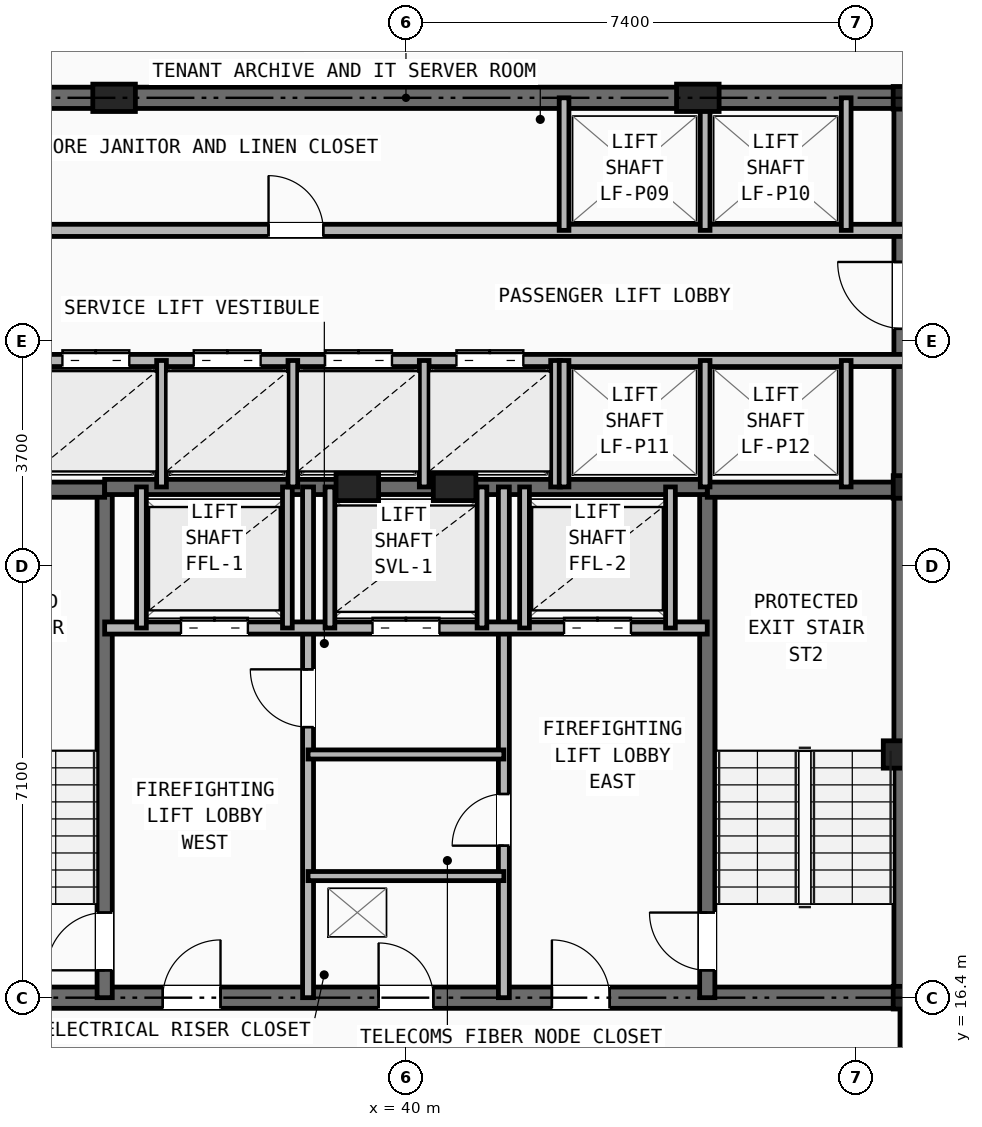
"""IFC4 building model, lengths in metres.
Left out: names, types, materials, properties, quantities, classifications, styles, units other than length and angle.
Written with IfcOpenShell. Run it as: python <this file> out.ifc"""

import sys

from ifc_helpers import new_model, si_unit, direction, frame, frame_2d, origin, origin_2d, place, context, subcontext, project, spatial, rectangle, i_section, extrude, element, fill, save


model = new_model("IFC4")
c1 = context("Model", 3, precision=1e-05, world=origin(), true_north=direction((0.0, 1.0)))
c2 = subcontext(c1, "Body", "Model", "MODEL_VIEW")
j1 = project(units=[si_unit("LENGTHUNIT", "METRE"), si_unit("PLANEANGLEUNIT", "RADIAN")], contexts=[c1])
p1 = place(None, origin())
s1 = spatial("IfcSite", under=j1, at=p1, CompositionType="ELEMENT")
p2 = place(p1, origin())
s2 = spatial("IfcBuilding", under=s1, at=p2, CompositionType="ELEMENT")
p3 = place(p2, frame((0.0, 0.0, 193.05)))
s3 = spatial("IfcBuildingStorey", under=s2, at=p3, CompositionType="ELEMENT", Elevation=193.05)
for number, where, z_axis, x_axis in (
    (1, (48.2, 16.4, 0.0), (0.0, 0.0, 1.0), (1.0, 0.0, 0.0)),
    (2, (48.2, 24.8, 0.0), (0.0, 0.0, 1.0), (1.0, 0.0, 0.0)),
    (3, (48.2, 31.2, 0.0), (0.0, 0.0, 1.0), (1.0, 0.0, 0.0)),
):
    element("IfcColumn", number, at=place(p3, frame(where, z_axis=z_axis, x_axis=x_axis)), inside=s3, PredefinedType="COLUMN", context=c2, shape_type="SweptSolid", body=[
        extrude(i_section(OverallWidth=0.374, OverallDepth=0.372, WebThickness=0.016, FlangeThickness=0.026, at=origin_2d()), origin(), (0.0, 0.0, 1.0), 3.45),
    ])
for number, where, z_axis, x_axis in (
    (4, (48.2, 20.4, 0.0), (0.0, 0.0, 1.0), (1.0, 0.0, 0.0)),
    (5, (35.2, 31.2, 0.0), (0.0, 0.0, 1.0), (1.0, 0.0, 0.0)),
    (6, (44.8, 31.2, 0.0), (0.0, 0.0, 1.0), (1.0, 0.0, 0.0)),
    (7, (39.2, 24.8, 0.0), (0.0, 0.0, 1.0), (1.0, 0.0, 0.0)),
    (8, (40.8, 24.8, 0.0), (0.0, 0.0, 1.0), (1.0, 0.0, 0.0)),
):
    element("IfcColumn", number, at=place(p3, frame(where, z_axis=z_axis, x_axis=x_axis)), inside=s3, PredefinedType="PILASTER", context=c2, shape_type="SweptSolid", body=[
        extrude(rectangle(XDim=0.7, YDim=0.45, at=origin_2d()), origin(), (0.0, 0.0, 1.0), 3.45),
    ])
p4 = place(p3, frame((31.8, 16.4, 0.0), z_axis=(0.0, 0.0, 1.0), x_axis=(1.0, 0.0, 0.0)))
e9 = element("IfcWall", 9, at=p4, inside=s3, PredefinedType="SHEAR", context=c2, shape_type="SweptSolid", body=[
    extrude(rectangle(XDim=16.4, YDim=0.35, at=frame_2d((8.2, 0.0))), origin(), (0.0, 0.0, 1.0), 3.03),
])
p5 = place(p4, frame((7.75, 0.0, 0.0)))
e10 = element("IfcOpeningElement", 10, at=p5, cuts=e9, PredefinedType="OPENING", context=c2, shape_type="SweptSolid", body=[
    extrude(rectangle(XDim=0.9, YDim=2.1, at=frame_2d((0.45, 1.05))), frame((0.0, 0.185, 0.0), z_axis=(0.0, -1.0, 0.0), x_axis=(1.0, 0.0, 0.0)), (0.0, 0.0, 1.0), 0.37),
])
p6 = place(p4, frame((4.2, 0.0, 0.0)))
e11 = element("IfcOpeningElement", 11, at=p6, cuts=e9, PredefinedType="OPENING", context=c2, shape_type="SweptSolid", body=[
    extrude(rectangle(XDim=0.95, YDim=2.1, at=frame_2d((0.475, 1.05))), frame((0.0, 0.185, 0.0), z_axis=(0.0, -1.0, 0.0), x_axis=(1.0, 0.0, 0.0)), (0.0, 0.0, 1.0), 0.37),
])
p7 = place(p4, frame((10.6, 0.0, 0.0)))
e12 = element("IfcOpeningElement", 12, at=p7, cuts=e9, PredefinedType="OPENING", context=c2, shape_type="SweptSolid", body=[
    extrude(rectangle(XDim=0.95, YDim=2.1, at=frame_2d((0.475, 1.05))), frame((0.0, 0.185, 0.0), z_axis=(0.0, -1.0, 0.0), x_axis=(1.0, 0.0, 0.0)), (0.0, 0.0, 1.0), 0.37),
])
p8 = place(p3, frame((31.8, 31.2, 0.0), z_axis=(0.0, 0.0, 1.0), x_axis=(1.0, 0.0, 0.0)))
e13 = element("IfcWall", 13, at=p8, inside=s3, PredefinedType="SHEAR", context=c2, shape_type="SweptSolid", body=[
    extrude(rectangle(XDim=16.4, YDim=0.35, at=frame_2d((8.2, 0.0))), origin(), (0.0, 0.0, 1.0), 3.03),
])
p9 = place(p3, frame((48.2, 16.4, 0.0), z_axis=(0.0, 0.0, 1.0), x_axis=(0.0, 1.0, 0.0)))
e14 = element("IfcWall", 14, at=p9, inside=s3, PredefinedType="SHEAR", context=c2, shape_type="SweptSolid", body=[
    extrude(rectangle(XDim=14.8, YDim=0.35, at=frame_2d((7.4, 0.0))), origin(), (0.0, 0.0, 1.0), 3.03),
])
p10 = place(p9, frame((11.0, 0.0, 0.0)))
e15 = element("IfcOpeningElement", 15, at=p10, cuts=e14, PredefinedType="OPENING", context=c2, shape_type="SweptSolid", body=[
    extrude(rectangle(XDim=1.1, YDim=2.15, at=frame_2d((0.55, 1.075))), frame((0.0, 0.185, 0.0), z_axis=(0.0, -1.0, 0.0), x_axis=(1.0, 0.0, 0.0)), (0.0, 0.0, 1.0), 0.37),
])
p11 = place(p3, frame((35.045, 16.4, 0.0), z_axis=(0.0, 0.0, 1.0), x_axis=(0.0, 1.0, 0.0)))
e16 = element("IfcWall", 16, at=p11, inside=s3, PredefinedType="SHEAR", context=c2, shape_type="SweptSolid", body=[
    extrude(rectangle(XDim=8.4, YDim=0.25, at=frame_2d((4.2, 0.0))), origin(), (0.0, 0.0, 1.0), 3.03),
])
p12 = place(p11, frame((0.45, 0.0, 0.0)))
e17 = element("IfcOpeningElement", 17, at=p12, cuts=e16, PredefinedType="OPENING", context=c2, shape_type="SweptSolid", body=[
    extrude(rectangle(XDim=0.95, YDim=2.1, at=frame_2d((0.475, 1.05))), frame((0.0, 0.135, 0.0), z_axis=(0.0, -1.0, 0.0), x_axis=(1.0, 0.0, 0.0)), (0.0, 0.0, 1.0), 0.27),
])
p13 = place(p3, frame((31.8, 24.755, 0.0), z_axis=(0.0, 0.0, 1.0), x_axis=(1.0, 0.0, 0.0)))
e18 = element("IfcWall", 18, at=p13, inside=s3, PredefinedType="SHEAR", context=c2, shape_type="SweptSolid", body=[
    extrude(rectangle(XDim=3.245, YDim=0.25, at=frame_2d((1.623, 0.0))), origin(), (0.0, 0.0, 1.0), 3.03),
])
p14 = place(p3, frame((44.955, 16.4, 0.0), z_axis=(0.0, 0.0, 1.0), x_axis=(0.0, 1.0, 0.0)))
e19 = element("IfcWall", 19, at=p14, inside=s3, PredefinedType="SHEAR", context=c2, shape_type="SweptSolid", body=[
    extrude(rectangle(XDim=8.4, YDim=0.25, at=frame_2d((4.2, 0.0))), origin(), (0.0, 0.0, 1.0), 3.03),
])
p15 = place(p14, frame((0.45, 0.0, 0.0)))
e20 = element("IfcOpeningElement", 20, at=p15, cuts=e19, PredefinedType="OPENING", context=c2, shape_type="SweptSolid", body=[
    extrude(rectangle(XDim=0.95, YDim=2.1, at=frame_2d((0.475, 1.05))), frame((0.0, 0.135, 0.0), z_axis=(0.0, -1.0, 0.0), x_axis=(1.0, 0.0, 0.0)), (0.0, 0.0, 1.0), 0.27),
])
p16 = place(p3, frame((44.955, 24.755, 0.0), z_axis=(0.0, 0.0, 1.0), x_axis=(1.0, 0.0, 0.0)))
e21 = element("IfcWall", 21, at=p16, inside=s3, PredefinedType="SHEAR", context=c2, shape_type="SweptSolid", body=[
    extrude(rectangle(XDim=3.245, YDim=0.25, at=frame_2d((1.623, 0.0))), origin(), (0.0, 0.0, 1.0), 3.03),
])
p17 = place(p3, frame((35.045, 24.8, 0.0), z_axis=(0.0, 0.0, 1.0), x_axis=(1.0, 0.0, 0.0)))
e22 = element("IfcWall", 22, at=p17, inside=s3, PredefinedType="SHEAR", context=c2, shape_type="SweptSolid", body=[
    extrude(rectangle(XDim=9.91, YDim=0.25, at=frame_2d((4.955, 0.0))), origin(), (0.0, 0.0, 1.0), 3.03),
])
p18 = place(p3, frame((38.39, 16.4, 0.0), z_axis=(0.0, 0.0, 1.0), x_axis=(0.0, 1.0, 0.0)))
e23 = element("IfcWall", 23, at=p18, inside=s3, PredefinedType="PARTITIONING", context=c2, shape_type="SweptSolid", body=[
    extrude(rectangle(XDim=8.4, YDim=0.18, at=frame_2d((4.2, 0.0))), origin(), (0.0, 0.0, 1.0), 2.758),
])
p19 = place(p18, frame((4.45, 0.0, 0.0)))
e24 = element("IfcOpeningElement", 24, at=p19, cuts=e23, PredefinedType="OPENING", context=c2, shape_type="SweptSolid", body=[
    extrude(rectangle(XDim=0.95, YDim=2.1, at=frame_2d((0.475, 1.05))), frame((0.0, 0.1, 0.0), z_axis=(0.0, -1.0, 0.0), x_axis=(1.0, 0.0, 0.0)), (0.0, 0.0, 1.0), 0.2),
])
p20 = place(p3, frame((41.61, 16.4, 0.0), z_axis=(0.0, 0.0, 1.0), x_axis=(0.0, 1.0, 0.0)))
e25 = element("IfcWall", 25, at=p20, inside=s3, PredefinedType="PARTITIONING", context=c2, shape_type="SweptSolid", body=[
    extrude(rectangle(XDim=8.4, YDim=0.18, at=frame_2d((4.2, 0.0))), origin(), (0.0, 0.0, 1.0), 2.758),
])
p21 = place(p20, frame((2.5, 0.0, 0.0)))
e26 = element("IfcOpeningElement", 26, at=p21, cuts=e25, PredefinedType="OPENING", context=c2, shape_type="SweptSolid", body=[
    extrude(rectangle(XDim=0.85, YDim=2.05, at=frame_2d((0.425, 1.025))), frame((0.0, 0.1, 0.0), z_axis=(0.0, -1.0, 0.0), x_axis=(1.0, 0.0, 0.0)), (0.0, 0.0, 1.0), 0.2),
])
p22 = place(p3, frame((35.045, 22.48, 0.0), z_axis=(0.0, 0.0, 1.0), x_axis=(1.0, 0.0, 0.0)))
e27 = element("IfcWall", 27, at=p22, inside=s3, PredefinedType="SOLIDWALL", context=c2, shape_type="SweptSolid", body=[
    extrude(rectangle(XDim=9.91, YDim=0.2, at=frame_2d((4.955, 0.0))), origin(), (0.0, 0.0, 1.0), 3.03),
])
p23 = place(p22, frame((1.255, 0.0, 0.0)))
e28 = element("IfcOpeningElement", 28, at=p23, cuts=e27, PredefinedType="OPENING", context=c2, shape_type="SweptSolid", body=[
    extrude(rectangle(XDim=1.1, YDim=2.15, at=frame_2d((0.55, 1.075))), frame((0.0, 0.11, 0.0), z_axis=(0.0, -1.0, 0.0), x_axis=(1.0, 0.0, 0.0)), (0.0, 0.0, 1.0), 0.22),
])
p24 = place(p22, frame((7.555, 0.0, 0.0)))
e29 = element("IfcOpeningElement", 29, at=p24, cuts=e27, PredefinedType="OPENING", context=c2, shape_type="SweptSolid", body=[
    extrude(rectangle(XDim=1.1, YDim=2.15, at=frame_2d((0.55, 1.075))), frame((0.0, 0.11, 0.0), z_axis=(0.0, -1.0, 0.0), x_axis=(1.0, 0.0, 0.0)), (0.0, 0.0, 1.0), 0.22),
])
p25 = place(p22, frame((4.405, 0.0, 0.0)))
e30 = element("IfcOpeningElement", 30, at=p25, cuts=e27, PredefinedType="OPENING", context=c2, shape_type="SweptSolid", body=[
    extrude(rectangle(XDim=1.1, YDim=2.15, at=frame_2d((0.55, 1.075))), frame((0.0, 0.11, 0.0), z_axis=(0.0, -1.0, 0.0), x_axis=(1.0, 0.0, 0.0)), (0.0, 0.0, 1.0), 0.22),
])
for number, where, z_axis, x_axis in (
    (31, (38.39, 18.4, 0.0), (0.0, 0.0, 1.0), (1.0, 0.0, 0.0)),
    (32, (38.39, 20.4, 0.0), (0.0, 0.0, 1.0), (1.0, 0.0, 0.0)),
):
    element("IfcWall", number, at=place(p3, frame(where, z_axis=z_axis, x_axis=x_axis)), inside=s3, PredefinedType="PARTITIONING", context=c2, shape_type="SweptSolid", body=[
        extrude(rectangle(XDim=3.22, YDim=0.15, at=frame_2d((1.61, 0.0))), origin(), (0.0, 0.0, 1.0), 3.03),
    ])
for number, where, z_axis, x_axis in (
    (33, (35.65, 22.48, 0.0), (0.0, 0.0, 1.0), (0.0, 1.0, 0.0)),
    (34, (38.05, 22.48, 0.0), (0.0, 0.0, 1.0), (0.0, 1.0, 0.0)),
    (35, (41.95, 22.48, 0.0), (0.0, 0.0, 1.0), (0.0, 1.0, 0.0)),
    (36, (44.35, 22.48, 0.0), (0.0, 0.0, 1.0), (0.0, 1.0, 0.0)),
    (37, (38.75, 22.48, 0.0), (0.0, 0.0, 1.0), (0.0, 1.0, 0.0)),
    (38, (41.25, 22.48, 0.0), (0.0, 0.0, 1.0), (0.0, 1.0, 0.0)),
):
    element("IfcWall", number, at=place(p3, frame(where, z_axis=z_axis, x_axis=x_axis)), inside=s3, PredefinedType="SOLIDWALL", context=c2, shape_type="SweptSolid", body=[
        extrude(rectangle(XDim=2.32, YDim=0.16, at=frame_2d((1.16, 0.0))), origin(), (0.0, 0.0, 1.0), 3.03),
    ])
p26 = place(p3, frame((31.8, 29.02, 0.0), z_axis=(0.0, 0.0, 1.0), x_axis=(1.0, 0.0, 0.0)))
e39 = element("IfcWall", 39, at=p26, inside=s3, PredefinedType="SOLIDWALL", context=c2, shape_type="SweptSolid", body=[
    extrude(rectangle(XDim=16.4, YDim=0.2, at=frame_2d((8.2, 0.0))), origin(), (0.0, 0.0, 1.0), 2.485),
])
p27 = place(p26, frame((0.55, 0.0, 0.0)))
e40 = element("IfcOpeningElement", 40, at=p27, cuts=e39, PredefinedType="OPENING", context=c2, shape_type="SweptSolid", body=[
    extrude(rectangle(XDim=0.85, YDim=2.05, at=frame_2d((0.425, 1.025))), frame((0.0, 0.11, 0.0), z_axis=(0.0, -1.0, 0.0), x_axis=(1.0, 0.0, 0.0)), (0.0, 0.0, 1.0), 0.22),
])
p28 = place(p26, frame((5.94, 0.0, 0.0)))
e41 = element("IfcOpeningElement", 41, at=p28, cuts=e39, PredefinedType="OPENING", context=c2, shape_type="SweptSolid", body=[
    extrude(rectangle(XDim=0.9, YDim=2.1, at=frame_2d((0.45, 1.05))), frame((0.0, 0.11, 0.0), z_axis=(0.0, -1.0, 0.0), x_axis=(1.0, 0.0, 0.0)), (0.0, 0.0, 1.0), 0.22),
])
p29 = place(p3, frame((31.8, 26.88, 0.0), z_axis=(0.0, 0.0, 1.0), x_axis=(1.0, 0.0, 0.0)))
e42 = element("IfcWall", 42, at=p29, inside=s3, PredefinedType="SOLIDWALL", context=c2, shape_type="SweptSolid", body=[
    extrude(rectangle(XDim=16.4, YDim=0.2, at=frame_2d((8.2, 0.0))), origin(), (0.0, 0.0, 1.0), 2.485),
])
p30 = place(p29, frame((0.55, 0.0, 0.0)))
e43 = element("IfcOpeningElement", 43, at=p30, cuts=e42, PredefinedType="OPENING", context=c2, shape_type="SweptSolid", body=[
    extrude(rectangle(XDim=0.85, YDim=2.05, at=frame_2d((0.425, 1.025))), frame((0.0, 0.11, 0.0), z_axis=(0.0, -1.0, 0.0), x_axis=(1.0, 0.0, 0.0)), (0.0, 0.0, 1.0), 0.22),
])
p31 = place(p29, frame((2.55, 0.0, 0.0)))
e44 = element("IfcOpeningElement", 44, at=p31, cuts=e42, PredefinedType="OPENING", context=c2, shape_type="SweptSolid", body=[
    extrude(rectangle(XDim=1.1, YDim=2.15, at=frame_2d((0.55, 1.075))), frame((0.0, 0.11, 0.0), z_axis=(0.0, -1.0, 0.0), x_axis=(1.0, 0.0, 0.0)), (0.0, 0.0, 1.0), 0.22),
])
p32 = place(p29, frame((4.71, 0.0, 0.0)))
e45 = element("IfcOpeningElement", 45, at=p32, cuts=e42, PredefinedType="OPENING", context=c2, shape_type="SweptSolid", body=[
    extrude(rectangle(XDim=1.1, YDim=2.15, at=frame_2d((0.55, 1.075))), frame((0.0, 0.11, 0.0), z_axis=(0.0, -1.0, 0.0), x_axis=(1.0, 0.0, 0.0)), (0.0, 0.0, 1.0), 0.22),
])
p33 = place(p29, frame((6.87, 0.0, 0.0)))
e46 = element("IfcOpeningElement", 46, at=p33, cuts=e42, PredefinedType="OPENING", context=c2, shape_type="SweptSolid", body=[
    extrude(rectangle(XDim=1.1, YDim=2.15, at=frame_2d((0.55, 1.075))), frame((0.0, 0.11, 0.0), z_axis=(0.0, -1.0, 0.0), x_axis=(1.0, 0.0, 0.0)), (0.0, 0.0, 1.0), 0.22),
])
p34 = place(p29, frame((9.03, 0.0, 0.0)))
e47 = element("IfcOpeningElement", 47, at=p34, cuts=e42, PredefinedType="OPENING", context=c2, shape_type="SweptSolid", body=[
    extrude(rectangle(XDim=1.1, YDim=2.15, at=frame_2d((0.55, 1.075))), frame((0.0, 0.11, 0.0), z_axis=(0.0, -1.0, 0.0), x_axis=(1.0, 0.0, 0.0)), (0.0, 0.0, 1.0), 0.22),
])
for number, where, z_axis, x_axis in (
    (48, (35.98, 24.8, 0.0), (0.0, 0.0, 1.0), (0.0, 1.0, 0.0)),
    (49, (38.14, 24.8, 0.0), (0.0, 0.0, 1.0), (0.0, 1.0, 0.0)),
    (50, (40.3, 24.8, 0.0), (0.0, 0.0, 1.0), (0.0, 1.0, 0.0)),
    (51, (42.46, 24.8, 0.0), (0.0, 0.0, 1.0), (0.0, 1.0, 0.0)),
):
    element("IfcWall", number, at=place(p3, frame(where, z_axis=z_axis, x_axis=x_axis)), inside=s3, PredefinedType="SOLIDWALL", context=c2, shape_type="SweptSolid", body=[
        extrude(rectangle(XDim=2.08, YDim=0.16, at=frame_2d((1.04, 0.0))), origin(), (0.0, 0.0, 1.0), 3.03),
    ])
for number, where, z_axis, x_axis in (
    (52, (42.6, 29.02, 0.0), (0.0, 0.0, 1.0), (0.0, 1.0, 0.0)),
    (53, (44.92, 29.02, 0.0), (0.0, 0.0, 1.0), (0.0, 1.0, 0.0)),
    (54, (47.24, 29.02, 0.0), (0.0, 0.0, 1.0), (0.0, 1.0, 0.0)),
):
    element("IfcWall", number, at=place(p3, frame(where, z_axis=z_axis, x_axis=x_axis)), inside=s3, PredefinedType="SOLIDWALL", context=c2, shape_type="SweptSolid", body=[
        extrude(rectangle(XDim=2.18, YDim=0.16, at=frame_2d((1.09, 0.0))), origin(), (0.0, 0.0, 1.0), 2.758),
    ])
for number, where, z_axis, x_axis in (
    (55, (42.6, 24.8, 0.0), (0.0, 0.0, 1.0), (0.0, 1.0, 0.0)),
    (56, (44.92, 24.8, 0.0), (0.0, 0.0, 1.0), (0.0, 1.0, 0.0)),
    (57, (47.24, 24.8, 0.0), (0.0, 0.0, 1.0), (0.0, 1.0, 0.0)),
):
    element("IfcWall", number, at=place(p3, frame(where, z_axis=z_axis, x_axis=x_axis)), inside=s3, PredefinedType="SOLIDWALL", context=c2, shape_type="SweptSolid", body=[
        extrude(rectangle(XDim=2.08, YDim=0.16, at=frame_2d((1.04, 0.0))), origin(), (0.0, 0.0, 1.0), 3.03),
    ])
p35 = place(p3, frame((48.2, 14.1, 0.0), z_axis=(0.0, 0.0, 1.0), x_axis=(0.0, 1.0, 0.0)))
e58 = element("IfcWall", 58, at=p35, inside=s3, PredefinedType="PARTITIONING", context=c2, shape_type="SweptSolid", body=[
    extrude(rectangle(XDim=2.3, YDim=0.15, at=frame_2d((1.15, 0.0))), origin(), (0.0, 0.0, 1.0), 2.485),
])
p36 = place(p5, origin())
e59 = element("IfcDoor", 59, at=p36, inside=s3, OperationType="SINGLE_SWING_LEFT", PredefinedType="DOOR", context=c2, shape_type="SweptSolid", body=[
    extrude(rectangle(XDim=0.9, YDim=2.1, at=frame_2d((0.45, 1.05))), frame((0.0, 0.025, 0.0), z_axis=(0.0, -1.0, 0.0), x_axis=(1.0, 0.0, 0.0)), (0.0, 0.0, 1.0), 0.05),
])
fill(e10, e59)
p37 = place(p21, origin())
e60 = element("IfcDoor", 60, at=p37, inside=s3, OperationType="SINGLE_SWING_LEFT", PredefinedType="DOOR", context=c2, shape_type="SweptSolid", body=[
    extrude(rectangle(XDim=0.85, YDim=2.05, at=frame_2d((0.425, 1.025))), frame((0.0, 0.025, 0.0), z_axis=(0.0, -1.0, 0.0), x_axis=(1.0, 0.0, 0.0)), (0.0, 0.0, 1.0), 0.05),
])
fill(e26, e60)
p38 = place(p19, origin())
e61 = element("IfcDoor", 61, at=p38, inside=s3, OperationType="SINGLE_SWING_RIGHT", PredefinedType="DOOR", context=c2, shape_type="SweptSolid", body=[
    extrude(rectangle(XDim=0.95, YDim=2.1, at=frame_2d((0.475, 1.05))), frame((0.0, 0.025, 0.0), z_axis=(0.0, -1.0, 0.0), x_axis=(1.0, 0.0, 0.0)), (0.0, 0.0, 1.0), 0.05),
])
fill(e24, e61)
p39 = place(p12, origin())
e62 = element("IfcDoor", 62, at=p39, inside=s3, OperationType="SINGLE_SWING_LEFT", PredefinedType="DOOR", context=c2, shape_type="SweptSolid", body=[
    extrude(rectangle(XDim=0.95, YDim=2.1, at=frame_2d((0.475, 1.05))), frame((0.0, 0.025, 0.0), z_axis=(0.0, -1.0, 0.0), x_axis=(1.0, 0.0, 0.0)), (0.0, 0.0, 1.0), 0.05),
])
fill(e17, e62)
p40 = place(p15, origin())
e63 = element("IfcDoor", 63, at=p40, inside=s3, OperationType="SINGLE_SWING_RIGHT", PredefinedType="DOOR", context=c2, shape_type="SweptSolid", body=[
    extrude(rectangle(XDim=0.95, YDim=2.1, at=frame_2d((0.475, 1.05))), frame((0.0, 0.025, 0.0), z_axis=(0.0, -1.0, 0.0), x_axis=(1.0, 0.0, 0.0)), (0.0, 0.0, 1.0), 0.05),
])
fill(e20, e63)
p41 = place(p6, origin())
e64 = element("IfcDoor", 64, at=p41, inside=s3, OperationType="SINGLE_SWING_RIGHT", PredefinedType="DOOR", context=c2, shape_type="SweptSolid", body=[
    extrude(rectangle(XDim=0.95, YDim=2.1, at=frame_2d((0.475, 1.05))), frame((0.0, 0.025, 0.0), z_axis=(0.0, -1.0, 0.0), x_axis=(1.0, 0.0, 0.0)), (0.0, 0.0, 1.0), 0.05),
])
fill(e11, e64)
p42 = place(p7, origin())
e65 = element("IfcDoor", 65, at=p42, inside=s3, OperationType="SINGLE_SWING_LEFT", PredefinedType="DOOR", context=c2, shape_type="SweptSolid", body=[
    extrude(rectangle(XDim=0.95, YDim=2.1, at=frame_2d((0.475, 1.05))), frame((0.0, 0.025, 0.0), z_axis=(0.0, -1.0, 0.0), x_axis=(1.0, 0.0, 0.0)), (0.0, 0.0, 1.0), 0.05),
])
fill(e12, e65)
p43 = place(p23, origin())
e66 = element("IfcDoor", 66, at=p43, inside=s3, OperationType="DOUBLE_DOOR_SLIDING", PredefinedType="DOOR", context=c2, shape_type="SweptSolid", body=[
    extrude(rectangle(XDim=1.1, YDim=2.15, at=frame_2d((0.55, 1.075))), frame((0.0, 0.025, 0.0), z_axis=(0.0, -1.0, 0.0), x_axis=(1.0, 0.0, 0.0)), (0.0, 0.0, 1.0), 0.05),
])
fill(e28, e66)
p44 = place(p24, origin())
e67 = element("IfcDoor", 67, at=p44, inside=s3, OperationType="DOUBLE_DOOR_SLIDING", PredefinedType="DOOR", context=c2, shape_type="SweptSolid", body=[
    extrude(rectangle(XDim=1.1, YDim=2.15, at=frame_2d((0.55, 1.075))), frame((0.0, 0.025, 0.0), z_axis=(0.0, -1.0, 0.0), x_axis=(1.0, 0.0, 0.0)), (0.0, 0.0, 1.0), 0.05),
])
fill(e29, e67)
p45 = place(p25, origin())
e68 = element("IfcDoor", 68, at=p45, inside=s3, OperationType="DOUBLE_DOOR_SLIDING", PredefinedType="DOOR", context=c2, shape_type="SweptSolid", body=[
    extrude(rectangle(XDim=1.1, YDim=2.15, at=frame_2d((0.55, 1.075))), frame((0.0, 0.025, 0.0), z_axis=(0.0, -1.0, 0.0), x_axis=(1.0, 0.0, 0.0)), (0.0, 0.0, 1.0), 0.05),
])
fill(e30, e68)
p46 = place(p28, origin())
e69 = element("IfcDoor", 69, at=p46, inside=s3, OperationType="SINGLE_SWING_LEFT", PredefinedType="DOOR", context=c2, shape_type="SweptSolid", body=[
    extrude(rectangle(XDim=0.9, YDim=2.1, at=frame_2d((0.45, 1.05))), frame((0.0, 0.025, 0.0), z_axis=(0.0, -1.0, 0.0), x_axis=(1.0, 0.0, 0.0)), (0.0, 0.0, 1.0), 0.05),
])
fill(e41, e69)
p47 = place(p31, origin())
e70 = element("IfcDoor", 70, at=p47, inside=s3, OperationType="DOUBLE_DOOR_SLIDING", PredefinedType="DOOR", context=c2, shape_type="SweptSolid", body=[
    extrude(rectangle(XDim=1.1, YDim=2.15, at=frame_2d((0.55, 1.075))), frame((0.0, 0.025, 0.0), z_axis=(0.0, -1.0, 0.0), x_axis=(1.0, 0.0, 0.0)), (0.0, 0.0, 1.0), 0.05),
])
fill(e44, e70)
p48 = place(p32, origin())
e71 = element("IfcDoor", 71, at=p48, inside=s3, OperationType="DOUBLE_DOOR_SLIDING", PredefinedType="DOOR", context=c2, shape_type="SweptSolid", body=[
    extrude(rectangle(XDim=1.1, YDim=2.15, at=frame_2d((0.55, 1.075))), frame((0.0, 0.025, 0.0), z_axis=(0.0, -1.0, 0.0), x_axis=(1.0, 0.0, 0.0)), (0.0, 0.0, 1.0), 0.05),
])
fill(e45, e71)
p49 = place(p33, origin())
e72 = element("IfcDoor", 72, at=p49, inside=s3, OperationType="DOUBLE_DOOR_SLIDING", PredefinedType="DOOR", context=c2, shape_type="SweptSolid", body=[
    extrude(rectangle(XDim=1.1, YDim=2.15, at=frame_2d((0.55, 1.075))), frame((0.0, 0.025, 0.0), z_axis=(0.0, -1.0, 0.0), x_axis=(1.0, 0.0, 0.0)), (0.0, 0.0, 1.0), 0.05),
])
fill(e46, e72)
p50 = place(p34, origin())
e73 = element("IfcDoor", 73, at=p50, inside=s3, OperationType="DOUBLE_DOOR_SLIDING", PredefinedType="DOOR", context=c2, shape_type="SweptSolid", body=[
    extrude(rectangle(XDim=1.1, YDim=2.15, at=frame_2d((0.55, 1.075))), frame((0.0, 0.025, 0.0), z_axis=(0.0, -1.0, 0.0), x_axis=(1.0, 0.0, 0.0)), (0.0, 0.0, 1.0), 0.05),
])
fill(e47, e73)
save(model, sys.argv[1])
